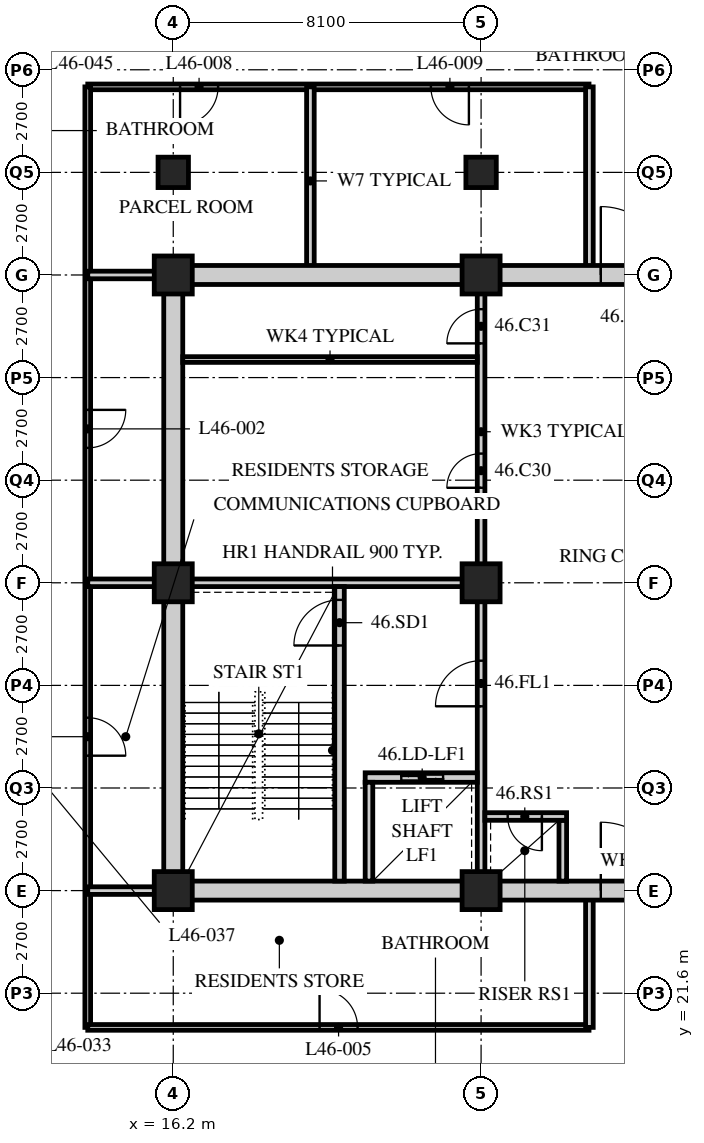
"""IFC4 building model, lengths in metres.
Left out: names, types, materials, properties, quantities, classifications, styles, units other than length and angle.
Written with IfcOpenShell. Run it as: python <this file> out.ifc"""

import sys

from ifc_helpers import new_model, si_unit, direction, frame, frame_2d, origin, origin_2d, place, context, subcontext, project, spatial, rectangle, hollow_rectangle, extrude, element, fill, save


model = new_model("IFC4")
c1 = context("Model", 3, precision=1e-05, world=origin(), true_north=direction((0.0, 1.0)))
c2 = subcontext(c1, "Body", "Model", "MODEL_VIEW")
j1 = project(units=[si_unit("LENGTHUNIT", "METRE"), si_unit("PLANEANGLEUNIT", "RADIAN")], contexts=[c1])
p1 = place(None, origin())
s1 = spatial("IfcSite", under=j1, at=p1, CompositionType="ELEMENT")
p2 = place(p1, origin())
s2 = spatial("IfcBuilding", under=s1, at=p2, CompositionType="ELEMENT")
p3 = place(p2, frame((0.0, 0.0, 181.2)))
s3 = spatial("IfcBuildingStorey", under=s2, at=p3, CompositionType="ELEMENT", Elevation=181.2)
for number, where, z_axis, x_axis in (
    (1, (16.2, 24.3, 0.0), (0.0, 0.0, 1.0), (1.0, 0.0, 0.0)),
    (2, (16.2, 32.4, 0.0), (0.0, 0.0, 1.0), (1.0, 0.0, 0.0)),
    (3, (16.2, 40.5, 0.0), (0.0, 0.0, 1.0), (1.0, 0.0, 0.0)),
):
    element("IfcColumn", number, at=place(p3, frame(where, z_axis=z_axis, x_axis=x_axis)), inside=s3, PredefinedType="COLUMN", context=c2, shape_type="SweptSolid", body=[
        extrude(hollow_rectangle(XDim=1.0, YDim=1.0, WallThickness=0.1, at=origin_2d()), origin(), (0.0, 0.0, 1.0), 3.6),
    ])
p4 = place(p3, frame((16.2, 43.2, 0.0), z_axis=(0.0, 0.0, 1.0), x_axis=(1.0, 0.0, 0.0)))
e4 = element("IfcColumn", 4, at=p4, inside=s3, PredefinedType="COLUMN", context=c2, shape_type="SweptSolid", body=[
    extrude(hollow_rectangle(XDim=0.8, YDim=0.8, WallThickness=0.08, at=origin_2d()), origin(), (0.0, 0.0, 1.0), 3.6),
])
for number, where, z_axis, x_axis in (
    (5, (24.3, 24.3, 0.0), (0.0, 0.0, 1.0), (1.0, 0.0, 0.0)),
    (6, (24.3, 32.4, 0.0), (0.0, 0.0, 1.0), (1.0, 0.0, 0.0)),
    (7, (24.3, 40.5, 0.0), (0.0, 0.0, 1.0), (1.0, 0.0, 0.0)),
):
    element("IfcColumn", number, at=place(p3, frame(where, z_axis=z_axis, x_axis=x_axis)), inside=s3, PredefinedType="COLUMN", context=c2, shape_type="SweptSolid", body=[
        extrude(hollow_rectangle(XDim=1.0, YDim=1.0, WallThickness=0.1, at=origin_2d()), origin(), (0.0, 0.0, 1.0), 3.6),
    ])
p5 = place(p3, frame((24.3, 43.2, 0.0), z_axis=(0.0, 0.0, 1.0), x_axis=(1.0, 0.0, 0.0)))
e8 = element("IfcColumn", 8, at=p5, inside=s3, PredefinedType="COLUMN", context=c2, shape_type="SweptSolid", body=[
    extrude(hollow_rectangle(XDim=0.8, YDim=0.8, WallThickness=0.08, at=origin_2d()), origin(), (0.0, 0.0, 1.0), 3.6),
])
p6 = place(p3, frame((27.14, 45.45, 0.0), z_axis=(0.0, 0.0, 1.0), x_axis=(-1.0, 0.0, 0.0)))
e9 = element("IfcWall", 9, at=p6, inside=s3, PredefinedType="PARTITIONING", context=c2, shape_type="SweptSolid", body=[
    extrude(rectangle(XDim=13.19, YDim=0.15, at=frame_2d((6.595, 0.0))), origin(), (0.0, 0.0, 1.0), 3.39),
])
p7 = place(p6, frame((9.761, 0.0, 0.0)))
e10 = element("IfcOpeningElement", 10, at=p7, cuts=e9, PredefinedType="OPENING", context=c2, shape_type="SweptSolid", body=[
    extrude(rectangle(XDim=1.0, YDim=2.1, at=frame_2d((0.5, 1.05))), frame((0.0, 0.085, 0.0), z_axis=(0.0, -1.0, 0.0), x_axis=(1.0, 0.0, 0.0)), (0.0, 0.0, 1.0), 0.17),
])
p8 = place(p6, frame((3.161, 0.0, 0.0)))
e11 = element("IfcOpeningElement", 11, at=p8, cuts=e9, PredefinedType="OPENING", context=c2, shape_type="SweptSolid", body=[
    extrude(rectangle(XDim=1.0, YDim=2.1, at=frame_2d((0.5, 1.05))), frame((0.0, 0.085, 0.0), z_axis=(0.0, -1.0, 0.0), x_axis=(1.0, 0.0, 0.0)), (0.0, 0.0, 1.0), 0.17),
])
p9 = place(p3, frame((13.95, 45.45, 0.0), z_axis=(0.0, 0.0, 1.0), x_axis=(0.0, -1.0, 0.0)))
e12 = element("IfcWall", 12, at=p9, inside=s3, PredefinedType="PARTITIONING", context=c2, shape_type="SweptSolid", body=[
    extrude(rectangle(XDim=24.75, YDim=0.15, at=frame_2d((12.375, 0.0))), origin(), (0.0, 0.0, 1.0), 3.39),
])
p10 = place(p9, frame((16.6, 0.0, 0.0)))
e13 = element("IfcOpeningElement", 13, at=p10, cuts=e12, PredefinedType="OPENING", context=c2, shape_type="SweptSolid", body=[
    extrude(rectangle(XDim=1.0, YDim=2.1, at=frame_2d((0.5, 1.05))), frame((0.0, 0.085, 0.0), z_axis=(0.0, -1.0, 0.0), x_axis=(1.0, 0.0, 0.0)), (0.0, 0.0, 1.0), 0.17),
])
p11 = place(p9, frame((8.5, 0.0, 0.0)))
e14 = element("IfcOpeningElement", 14, at=p11, cuts=e12, PredefinedType="OPENING", context=c2, shape_type="SweptSolid", body=[
    extrude(rectangle(XDim=1.0, YDim=2.1, at=frame_2d((0.5, 1.05))), frame((0.0, 0.085, 0.0), z_axis=(0.0, -1.0, 0.0), x_axis=(1.0, 0.0, 0.0)), (0.0, 0.0, 1.0), 0.17),
])
p12 = place(p3, frame((13.95, 20.7, 0.0), z_axis=(0.0, 0.0, 1.0), x_axis=(1.0, 0.0, 0.0)))
e15 = element("IfcWall", 15, at=p12, inside=s3, PredefinedType="PARTITIONING", context=c2, shape_type="SweptSolid", body=[
    extrude(rectangle(XDim=13.19, YDim=0.15, at=frame_2d((6.595, 0.0))), origin(), (0.0, 0.0, 1.0), 3.39),
])
p13 = place(p12, frame((6.1, 0.0, 0.0)))
e16 = element("IfcOpeningElement", 16, at=p13, cuts=e15, PredefinedType="OPENING", context=c2, shape_type="SweptSolid", body=[
    extrude(rectangle(XDim=1.0, YDim=2.1, at=frame_2d((0.5, 1.05))), frame((0.0, 0.085, 0.0), z_axis=(0.0, -1.0, 0.0), x_axis=(1.0, 0.0, 0.0)), (0.0, 0.0, 1.0), 0.17),
])
p14 = place(p3, frame((13.95, 32.4, 0.0), z_axis=(0.0, 0.0, 1.0), x_axis=(1.0, 0.0, 0.0)))
e17 = element("IfcWall", 17, at=p14, inside=s3, PredefinedType="SOLIDWALL", context=c2, shape_type="SweptSolid", body=[
    extrude(rectangle(XDim=2.25, YDim=0.2, at=frame_2d((1.125, 0.0))), origin(), (0.0, 0.0, 1.0), 3.39),
])
p15 = place(p3, frame((27.15, 20.7, 0.0), z_axis=(0.0, 0.0, 1.0), x_axis=(0.0, 1.0, 0.0)))
e18 = element("IfcWall", 18, at=p15, inside=s3, PredefinedType="SOLIDWALL", context=c2, shape_type="SweptSolid", body=[
    extrude(rectangle(XDim=3.6, YDim=0.2, at=frame_2d((1.8, 0.0))), origin(), (0.0, 0.0, 1.0), 3.39),
])
for number, where, z_axis, x_axis in (
    (19, (19.809, 45.45, 0.0), (0.0, 0.0, 1.0), (0.0, -1.0, 0.0)),
    (20, (27.15, 40.5, 0.0), (0.0, 0.0, 1.0), (0.0, 1.0, 0.0)),
):
    element("IfcWall", number, at=place(p3, frame(where, z_axis=z_axis, x_axis=x_axis)), inside=s3, PredefinedType="SOLIDWALL", context=c2, shape_type="SweptSolid", body=[
        extrude(rectangle(XDim=4.95, YDim=0.2, at=frame_2d((2.475, 0.0))), origin(), (0.0, 0.0, 1.0), 3.39),
    ])
for number, where, z_axis, x_axis in (
    (21, (13.95, 24.3, 0.0), (0.0, 0.0, 1.0), (1.0, 0.0, 0.0)),
    (22, (13.95, 40.5, 0.0), (0.0, 0.0, 1.0), (1.0, 0.0, 0.0)),
):
    element("IfcWall", number, at=place(p3, frame(where, z_axis=z_axis, x_axis=x_axis)), inside=s3, PredefinedType="SOLIDWALL", context=c2, shape_type="SweptSolid", body=[
        extrude(rectangle(XDim=2.25, YDim=0.2, at=frame_2d((1.125, 0.0))), origin(), (0.0, 0.0, 1.0), 3.39),
    ])
p16 = place(p3, frame((15.95, 24.3, 0.0), z_axis=(0.0, 0.0, 1.0), x_axis=(1.0, 0.0, 0.0)))
e23 = element("IfcWall", 23, at=p16, inside=s3, PredefinedType="SOLIDWALL", context=c2, shape_type="SweptSolid", body=[
    extrude(rectangle(XDim=24.8, YDim=0.5, at=frame_2d((12.4, 0.0))), origin(), (0.0, 0.0, 1.0), 2.74),
])
p17 = place(p16, frame((11.5, 0.0, 0.0)))
e24 = element("IfcOpeningElement", 24, at=p17, cuts=e23, PredefinedType="OPENING", context=c2, shape_type="SweptSolid", body=[
    extrude(rectangle(XDim=1.8, YDim=2.4, at=frame_2d((0.9, 1.2))), frame((0.0, 0.26, 0.0), z_axis=(0.0, -1.0, 0.0), x_axis=(1.0, 0.0, 0.0)), (0.0, 0.0, 1.0), 0.52),
])
p18 = place(p3, frame((15.95, 40.5, 0.0), z_axis=(0.0, 0.0, 1.0), x_axis=(1.0, 0.0, 0.0)))
e25 = element("IfcWall", 25, at=p18, inside=s3, PredefinedType="SOLIDWALL", context=c2, shape_type="SweptSolid", body=[
    extrude(rectangle(XDim=24.8, YDim=0.5, at=frame_2d((12.4, 0.0))), origin(), (0.0, 0.0, 1.0), 2.74),
])
p19 = place(p18, frame((11.5, 0.0, 0.0)))
e26 = element("IfcOpeningElement", 26, at=p19, cuts=e25, PredefinedType="OPENING", context=c2, shape_type="SweptSolid", body=[
    extrude(rectangle(XDim=1.8, YDim=2.4, at=frame_2d((0.9, 1.2))), frame((0.0, 0.26, 0.0), z_axis=(0.0, -1.0, 0.0), x_axis=(1.0, 0.0, 0.0)), (0.0, 0.0, 1.0), 0.52),
])
p20 = place(p3, frame((16.2, 24.55, 0.0), z_axis=(0.0, 0.0, 1.0), x_axis=(0.0, 1.0, 0.0)))
e27 = element("IfcWall", 27, at=p20, inside=s3, PredefinedType="SOLIDWALL", context=c2, shape_type="SweptSolid", body=[
    extrude(rectangle(XDim=15.7, YDim=0.5, at=frame_2d((7.85, 0.0))), origin(), (0.0, 0.0, 1.0), 2.778),
])
p21 = place(p3, frame((16.45, 32.4, 0.0), z_axis=(0.0, 0.0, 1.0), x_axis=(1.0, 0.0, 0.0)))
e28 = element("IfcWall", 28, at=p21, inside=s3, PredefinedType="SOLIDWALL", context=c2, shape_type="SweptSolid", body=[
    extrude(rectangle(XDim=7.95, YDim=0.2, at=frame_2d((3.975, 0.0))), origin(), (0.0, 0.0, 1.0), 2.778),
])
p22 = place(p3, frame((24.3, 24.55, 0.0), z_axis=(0.0, 0.0, 1.0), x_axis=(0.0, 1.0, 0.0)))
e29 = element("IfcWall", 29, at=p22, inside=s3, PredefinedType="SOLIDWALL", context=c2, shape_type="SweptSolid", body=[
    extrude(rectangle(XDim=7.75, YDim=0.2, at=frame_2d((3.875, 0.0))), origin(), (0.0, 0.0, 1.0), 2.778),
])
p23 = place(p22, frame((4.6, 0.0, 0.0)))
e30 = element("IfcOpeningElement", 30, at=p23, cuts=e29, PredefinedType="OPENING", context=c2, shape_type="SweptSolid", body=[
    extrude(rectangle(XDim=1.2, YDim=2.1, at=frame_2d((0.6, 1.05))), frame((0.0, 0.11, 0.0), z_axis=(0.0, -1.0, 0.0), x_axis=(1.0, 0.0, 0.0)), (0.0, 0.0, 1.0), 0.22),
])
p24 = place(p3, frame((20.575, 24.55, 0.0), z_axis=(0.0, 0.0, 1.0), x_axis=(0.0, 1.0, 0.0)))
e31 = element("IfcWall", 31, at=p24, inside=s3, PredefinedType="SOLIDWALL", context=c2, shape_type="SweptSolid", body=[
    extrude(rectangle(XDim=7.75, YDim=0.25, at=frame_2d((3.875, 0.0))), origin(), (0.0, 0.0, 1.0), 3.39),
])
p25 = place(p24, frame((6.2, 0.0, 0.0)))
e32 = element("IfcOpeningElement", 32, at=p25, cuts=e31, PredefinedType="OPENING", context=c2, shape_type="SweptSolid", body=[
    extrude(rectangle(XDim=1.2, YDim=2.1, at=frame_2d((0.6, 1.05))), frame((0.0, 0.135, 0.0), z_axis=(0.0, -1.0, 0.0), x_axis=(1.0, 0.0, 0.0)), (0.0, 0.0, 1.0), 0.27),
])
p26 = place(p3, frame((21.25, 27.275, 0.0), z_axis=(0.0, 0.0, 1.0), x_axis=(1.0, 0.0, 0.0)))
e33 = element("IfcWall", 33, at=p26, inside=s3, PredefinedType="SOLIDWALL", context=c2, shape_type="SweptSolid", body=[
    extrude(rectangle(XDim=2.95, YDim=0.25, at=frame_2d((1.475, 0.0))), origin(), (0.0, 0.0, 1.0), 3.39),
])
p27 = place(p26, frame((0.95, 0.0, 0.0)))
e34 = element("IfcOpeningElement", 34, at=p27, cuts=e33, PredefinedType="OPENING", context=c2, shape_type="SweptSolid", body=[
    extrude(rectangle(XDim=1.1, YDim=2.4, at=frame_2d((0.55, 1.2))), frame((0.0, 0.135, 0.0), z_axis=(0.0, -1.0, 0.0), x_axis=(1.0, 0.0, 0.0)), (0.0, 0.0, 1.0), 0.27),
])
p28 = place(p3, frame((21.35, 24.55, 0.0), z_axis=(0.0, 0.0, 1.0), x_axis=(0.0, 1.0, 0.0)))
e35 = element("IfcWall", 35, at=p28, inside=s3, PredefinedType="SOLIDWALL", context=c2, shape_type="SweptSolid", body=[
    extrude(rectangle(XDim=2.6, YDim=0.2, at=frame_2d((1.3, 0.0))), origin(), (0.0, 0.0, 1.0), 3.39),
])
p29 = place(p3, frame((26.45, 24.55, 0.0), z_axis=(0.0, 0.0, 1.0), x_axis=(0.0, 1.0, 0.0)))
e36 = element("IfcWall", 36, at=p29, inside=s3, PredefinedType="SOLIDWALL", context=c2, shape_type="SweptSolid", body=[
    extrude(rectangle(XDim=1.6, YDim=0.2, at=frame_2d((0.8, 0.0))), origin(), (0.0, 0.0, 1.0), 3.39),
])
p30 = place(p3, frame((24.4, 26.25, 0.0), z_axis=(0.0, 0.0, 1.0), x_axis=(1.0, 0.0, 0.0)))
e37 = element("IfcWall", 37, at=p30, inside=s3, PredefinedType="SOLIDWALL", context=c2, shape_type="SweptSolid", body=[
    extrude(rectangle(XDim=2.15, YDim=0.2, at=frame_2d((1.075, 0.0))), origin(), (0.0, 0.0, 1.0), 3.39),
])
p31 = place(p30, frame((0.6, 0.0, 0.0)))
e38 = element("IfcOpeningElement", 38, at=p31, cuts=e37, PredefinedType="OPENING", context=c2, shape_type="SweptSolid", body=[
    extrude(rectangle(XDim=0.9, YDim=2.1, at=frame_2d((0.45, 1.05))), frame((0.0, 0.11, 0.0), z_axis=(0.0, -1.0, 0.0), x_axis=(1.0, 0.0, 0.0)), (0.0, 0.0, 1.0), 0.22),
])
p32 = place(p3, frame((24.3, 32.5, 0.0), z_axis=(0.0, 0.0, 1.0), x_axis=(0.0, 1.0, 0.0)))
e39 = element("IfcWall", 39, at=p32, inside=s3, PredefinedType="PARTITIONING", context=c2, shape_type="SweptSolid", body=[
    extrude(rectangle(XDim=7.75, YDim=0.2, at=frame_2d((3.875, 0.0))), origin(), (0.0, 0.0, 1.0), 2.778),
])
p33 = place(p32, frame((2.4, 0.0, 0.0)))
e40 = element("IfcOpeningElement", 40, at=p33, cuts=e39, PredefinedType="OPENING", context=c2, shape_type="SweptSolid", body=[
    extrude(rectangle(XDim=0.9, YDim=2.1, at=frame_2d((0.45, 1.05))), frame((0.0, 0.11, 0.0), z_axis=(0.0, -1.0, 0.0), x_axis=(1.0, 0.0, 0.0)), (0.0, 0.0, 1.0), 0.22),
])
p34 = place(p32, frame((6.2, 0.0, 0.0)))
e41 = element("IfcOpeningElement", 41, at=p34, cuts=e39, PredefinedType="OPENING", context=c2, shape_type="SweptSolid", body=[
    extrude(rectangle(XDim=0.9, YDim=2.1, at=frame_2d((0.45, 1.05))), frame((0.0, 0.11, 0.0), z_axis=(0.0, -1.0, 0.0), x_axis=(1.0, 0.0, 0.0)), (0.0, 0.0, 1.0), 0.22),
])
p35 = place(p3, frame((16.45, 38.275, 0.0), z_axis=(0.0, 0.0, 1.0), x_axis=(1.0, 0.0, 0.0)))
e42 = element("IfcWall", 42, at=p35, inside=s3, PredefinedType="PARTITIONING", context=c2, shape_type="SweptSolid", body=[
    extrude(rectangle(XDim=7.75, YDim=0.15, at=frame_2d((3.875, 0.0))), origin(), (0.0, 0.0, 1.0), 3.39),
])
p36 = place(p10, origin())
e43 = element("IfcDoor", 43, at=p36, inside=s3, OperationType="SINGLE_SWING_RIGHT", PredefinedType="DOOR", context=c2, shape_type="SweptSolid", body=[
    extrude(rectangle(XDim=1.0, YDim=2.1, at=frame_2d((0.5, 1.05))), frame((0.0, 0.025, 0.0), z_axis=(0.0, -1.0, 0.0), x_axis=(1.0, 0.0, 0.0)), (0.0, 0.0, 1.0), 0.05),
])
fill(e13, e43)
p37 = place(p11, origin())
e44 = element("IfcDoor", 44, at=p37, inside=s3, OperationType="SINGLE_SWING_LEFT", PredefinedType="DOOR", context=c2, shape_type="SweptSolid", body=[
    extrude(rectangle(XDim=1.0, YDim=2.1, at=frame_2d((0.5, 1.05))), frame((0.0, 0.025, 0.0), z_axis=(0.0, -1.0, 0.0), x_axis=(1.0, 0.0, 0.0)), (0.0, 0.0, 1.0), 0.05),
])
fill(e14, e44)
p38 = place(p13, origin())
e45 = element("IfcDoor", 45, at=p38, inside=s3, OperationType="SINGLE_SWING_LEFT", PredefinedType="DOOR", context=c2, shape_type="SweptSolid", body=[
    extrude(rectangle(XDim=1.0, YDim=2.1, at=frame_2d((0.5, 1.05))), frame((0.0, 0.025, 0.0), z_axis=(0.0, -1.0, 0.0), x_axis=(1.0, 0.0, 0.0)), (0.0, 0.0, 1.0), 0.05),
])
fill(e16, e45)
p39 = place(p7, origin())
e46 = element("IfcDoor", 46, at=p39, inside=s3, OperationType="SINGLE_SWING_RIGHT", PredefinedType="DOOR", context=c2, shape_type="SweptSolid", body=[
    extrude(rectangle(XDim=1.0, YDim=2.1, at=frame_2d((0.5, 1.05))), frame((0.0, 0.025, 0.0), z_axis=(0.0, -1.0, 0.0), x_axis=(1.0, 0.0, 0.0)), (0.0, 0.0, 1.0), 0.05),
])
fill(e10, e46)
p40 = place(p8, origin())
e47 = element("IfcDoor", 47, at=p40, inside=s3, OperationType="SINGLE_SWING_LEFT", PredefinedType="DOOR", context=c2, shape_type="SweptSolid", body=[
    extrude(rectangle(XDim=1.0, YDim=2.1, at=frame_2d((0.5, 1.05))), frame((0.0, 0.025, 0.0), z_axis=(0.0, -1.0, 0.0), x_axis=(1.0, 0.0, 0.0)), (0.0, 0.0, 1.0), 0.05),
])
fill(e11, e47)
p41 = place(p33, origin())
e48 = element("IfcDoor", 48, at=p41, inside=s3, OperationType="SINGLE_SWING_LEFT", PredefinedType="DOOR", context=c2, shape_type="SweptSolid", body=[
    extrude(rectangle(XDim=0.9, YDim=2.1, at=frame_2d((0.45, 1.05))), frame((0.0, 0.025, 0.0), z_axis=(0.0, -1.0, 0.0), x_axis=(1.0, 0.0, 0.0)), (0.0, 0.0, 1.0), 0.05),
])
fill(e40, e48)
p42 = place(p34, origin())
e49 = element("IfcDoor", 49, at=p42, inside=s3, OperationType="SINGLE_SWING_LEFT", PredefinedType="DOOR", context=c2, shape_type="SweptSolid", body=[
    extrude(rectangle(XDim=0.9, YDim=2.1, at=frame_2d((0.45, 1.05))), frame((0.0, 0.025, 0.0), z_axis=(0.0, -1.0, 0.0), x_axis=(1.0, 0.0, 0.0)), (0.0, 0.0, 1.0), 0.05),
])
fill(e41, e49)
p43 = place(p25, origin())
e50 = element("IfcDoor", 50, at=p43, inside=s3, OperationType="SINGLE_SWING_LEFT", PredefinedType="DOOR", context=c2, shape_type="SweptSolid", body=[
    extrude(rectangle(XDim=1.2, YDim=2.1, at=frame_2d((0.6, 1.05))), frame((0.0, 0.025, 0.0), z_axis=(0.0, -1.0, 0.0), x_axis=(1.0, 0.0, 0.0)), (0.0, 0.0, 1.0), 0.05),
])
fill(e32, e50)
p44 = place(p23, origin())
e51 = element("IfcDoor", 51, at=p44, inside=s3, OperationType="SINGLE_SWING_LEFT", PredefinedType="DOOR", context=c2, shape_type="SweptSolid", body=[
    extrude(rectangle(XDim=1.2, YDim=2.1, at=frame_2d((0.6, 1.05))), frame((0.0, 0.025, 0.0), z_axis=(0.0, -1.0, 0.0), x_axis=(1.0, 0.0, 0.0)), (0.0, 0.0, 1.0), 0.05),
])
fill(e30, e51)
p45 = place(p31, origin())
e52 = element("IfcDoor", 52, at=p45, inside=s3, OperationType="SINGLE_SWING_LEFT", PredefinedType="DOOR", context=c2, shape_type="SweptSolid", body=[
    extrude(rectangle(XDim=0.9, YDim=2.1, at=frame_2d((0.45, 1.05))), frame((0.0, 0.025, 0.0), z_axis=(0.0, -1.0, 0.0), x_axis=(1.0, 0.0, 0.0)), (0.0, 0.0, 1.0), 0.05),
])
fill(e38, e52)
p46 = place(p27, origin())
e53 = element("IfcDoor", 53, at=p46, inside=s3, OperationType="DOUBLE_DOOR_SLIDING", PredefinedType="DOOR", context=c2, shape_type="SweptSolid", body=[
    extrude(rectangle(XDim=1.1, YDim=2.4, at=frame_2d((0.55, 1.2))), frame((0.0, 0.025, 0.0), z_axis=(0.0, -1.0, 0.0), x_axis=(1.0, 0.0, 0.0)), (0.0, 0.0, 1.0), 0.05),
])
fill(e34, e53)
p47 = place(p17, origin())
e54 = element("IfcDoor", 54, at=p47, inside=s3, OperationType="DOUBLE_DOOR_SINGLE_SWING", PredefinedType="DOOR", context=c2, shape_type="SweptSolid", body=[
    extrude(rectangle(XDim=1.8, YDim=2.4, at=frame_2d((0.9, 1.2))), frame((0.0, 0.025, 0.0), z_axis=(0.0, -1.0, 0.0), x_axis=(1.0, 0.0, 0.0)), (0.0, 0.0, 1.0), 0.05),
])
fill(e24, e54)
p48 = place(p19, origin())
e55 = element("IfcDoor", 55, at=p48, inside=s3, OperationType="DOUBLE_DOOR_SINGLE_SWING", PredefinedType="DOOR", context=c2, shape_type="SweptSolid", body=[
    extrude(rectangle(XDim=1.8, YDim=2.4, at=frame_2d((0.9, 1.2))), frame((0.0, 0.025, 0.0), z_axis=(0.0, -1.0, 0.0), x_axis=(1.0, 0.0, 0.0)), (0.0, 0.0, 1.0), 0.05),
])
fill(e26, e55)
save(model, sys.argv[1])
